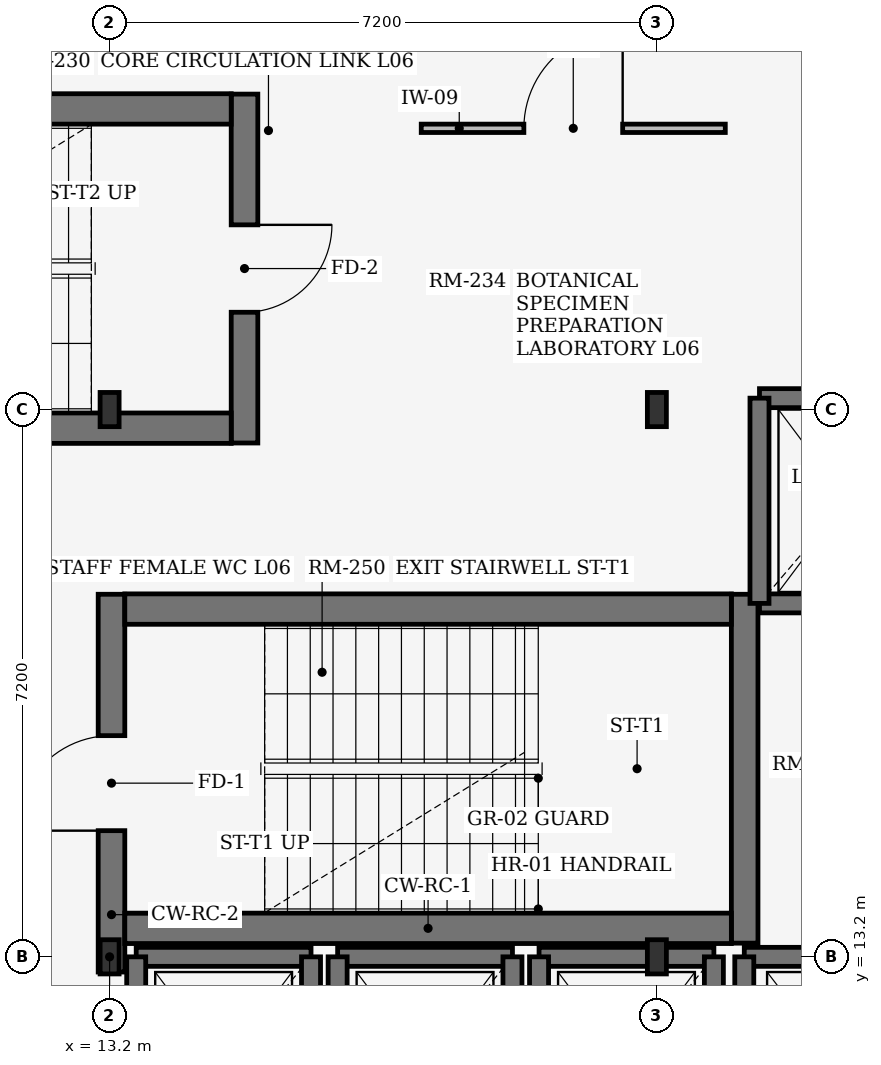
"""IFC4 building model, lengths in metres.
Left out: names, types, materials, properties, quantities, classifications, styles, units other than length and angle.
Written with IfcOpenShell. Run it as: python <this file> out.ifc"""

import sys

from ifc_helpers import new_model, si_unit, direction, frame, frame_2d, origin, origin_2d, place, context, subcontext, project, spatial, rectangle, i_section, extrude, element, fill, save


model = new_model("IFC4")
c1 = context("Model", 3, precision=1e-05, world=origin(), true_north=direction((0.0, 1.0)))
c2 = subcontext(c1, "Body", "Model", "MODEL_VIEW")
j1 = project(units=[si_unit("LENGTHUNIT", "METRE"), si_unit("PLANEANGLEUNIT", "RADIAN")], contexts=[c1])
p1 = place(None, origin())
s1 = spatial("IfcSite", under=j1, at=p1, CompositionType="ELEMENT")
p2 = place(p1, origin())
s2 = spatial("IfcBuilding", under=s1, at=p2, CompositionType="ELEMENT")
p3 = place(p2, frame((0.0, 0.0, 24.9)))
s3 = spatial("IfcBuildingStorey", under=s2, at=p3, CompositionType="ELEMENT", Elevation=24.9)
for number, where, z_axis, x_axis in (
    (1, (13.2, 13.2, 0.0), (0.0, 0.0, 1.0), (1.0, 0.0, 0.0)),
    (2, (13.2, 20.4, 0.0), (0.0, 0.0, 1.0), (1.0, 0.0, 0.0)),
    (3, (20.4, 13.2, 0.0), (0.0, 0.0, 1.0), (1.0, 0.0, 0.0)),
    (4, (20.4, 20.4, 0.0), (0.0, 0.0, 1.0), (1.0, 0.0, 0.0)),
):
    element("IfcColumn", number, at=place(p3, frame(where, z_axis=z_axis, x_axis=x_axis)), inside=s3, PredefinedType="COLUMN", context=c2, shape_type="SweptSolid", body=[
        extrude(i_section(OverallWidth=0.25, OverallDepth=0.45, WebThickness=0.011, FlangeThickness=0.014, at=origin_2d()), origin(), (0.0, 0.0, 1.0), 3.65),
    ])
p4 = place(p3, frame((13.225, 13.0, 0.0), z_axis=(0.0, 0.0, 1.0), x_axis=(0.0, 1.0, 0.0)))
e5 = element("IfcWall", 5, at=p4, inside=s3, PredefinedType="SHEAR", context=c2, shape_type="SweptSolid", body=[
    extrude(rectangle(XDim=4.97, YDim=0.35, at=frame_2d((2.485, 0.0))), origin(), (0.0, 0.0, 1.0), 3.65),
])
p5 = place(p4, frame((1.86, 0.0, 0.0)))
e6 = element("IfcOpeningElement", 6, at=p5, cuts=e5, PredefinedType="OPENING", context=c2, shape_type="SweptSolid", body=[
    extrude(rectangle(XDim=1.25, YDim=2.2, at=frame_2d((0.625, 1.1))), frame((0.0, 0.185, 0.0), z_axis=(0.0, -1.0, 0.0), x_axis=(1.0, 0.0, 0.0)), (0.0, 0.0, 1.0), 0.37),
])
p6 = place(p3, frame((21.555, 13.38, 0.0), z_axis=(0.0, 0.0, 1.0), x_axis=(0.0, 1.0, 0.0)))
e7 = element("IfcWall", 7, at=p6, inside=s3, PredefinedType="SHEAR", context=c2, shape_type="SweptSolid", body=[
    extrude(rectangle(XDim=4.59, YDim=0.35, at=frame_2d((2.295, 0.0))), origin(), (0.0, 0.0, 1.0), 3.65),
])
for number, where, z_axis, x_axis in (
    (8, (13.4, 13.575, 0.0), (0.0, 0.0, 1.0), (1.0, 0.0, 0.0)),
    (9, (13.4, 17.775, 0.0), (0.0, 0.0, 1.0), (1.0, 0.0, 0.0)),
):
    element("IfcWall", number, at=place(p3, frame(where, z_axis=z_axis, x_axis=x_axis)), inside=s3, PredefinedType="SHEAR", context=c2, shape_type="SweptSolid", body=[
        extrude(rectangle(XDim=7.98, YDim=0.4, at=frame_2d((3.99, 0.0))), origin(), (0.0, 0.0, 1.0), 3.65),
    ])
p7 = place(p3, frame((14.975, 24.55, 0.0), z_axis=(0.0, 0.0, 1.0), x_axis=(0.0, -1.0, 0.0)))
e10 = element("IfcWall", 10, at=p7, inside=s3, PredefinedType="SHEAR", context=c2, shape_type="SweptSolid", body=[
    extrude(rectangle(XDim=4.59, YDim=0.35, at=frame_2d((2.295, 0.0))), origin(), (0.0, 0.0, 1.0), 3.65),
])
p8 = place(p7, frame((1.72, 0.0, 0.0)))
e11 = element("IfcOpeningElement", 11, at=p8, cuts=e10, PredefinedType="OPENING", context=c2, shape_type="SweptSolid", body=[
    extrude(rectangle(XDim=1.15, YDim=2.2, at=frame_2d((0.575, 1.1))), frame((0.0, 0.185, 0.0), z_axis=(0.0, -1.0, 0.0), x_axis=(1.0, 0.0, 0.0)), (0.0, 0.0, 1.0), 0.37),
])
for number, where, z_axis, x_axis in (
    (12, (14.8, 24.355, 0.0), (0.0, 0.0, 1.0), (-1.0, 0.0, 0.0)),
    (13, (14.8, 20.155, 0.0), (0.0, 0.0, 1.0), (-1.0, 0.0, 0.0)),
):
    element("IfcWall", number, at=place(p3, frame(where, z_axis=z_axis, x_axis=x_axis)), inside=s3, PredefinedType="SHEAR", context=c2, shape_type="SweptSolid", body=[
        extrude(rectangle(XDim=7.98, YDim=0.4, at=frame_2d((3.99, 0.0))), origin(), (0.0, 0.0, 1.0), 3.65),
    ])
p9 = place(p3, frame((21.75, 17.85, 0.0), z_axis=(0.0, 0.0, 1.0), x_axis=(1.0, 0.0, 0.0)))
e14 = element("IfcWall", 14, at=p9, inside=s3, PredefinedType="SHEAR", context=c2, shape_type="SweptSolid", body=[
    extrude(rectangle(XDim=2.3, YDim=0.25, at=frame_2d((1.15, 0.0))), origin(), (0.0, 0.0, 1.0), 3.65),
])
p10 = place(p9, frame((0.6, 0.0, 0.0)))
e15 = element("IfcOpeningElement", 15, at=p10, cuts=e14, PredefinedType="OPENING", context=c2, shape_type="SweptSolid", body=[
    extrude(rectangle(XDim=1.1, YDim=2.2, at=frame_2d((0.55, 1.1))), frame((0.0, 0.135, 0.0), z_axis=(0.0, -1.0, 0.0), x_axis=(1.0, 0.0, 0.0)), (0.0, 0.0, 1.0), 0.27),
])
p11 = place(p3, frame((21.75, 20.55, 0.0), z_axis=(0.0, 0.0, 1.0), x_axis=(1.0, 0.0, 0.0)))
e16 = element("IfcWall", 16, at=p11, inside=s3, PredefinedType="SHEAR", context=c2, shape_type="SweptSolid", body=[
    extrude(rectangle(XDim=2.3, YDim=0.25, at=frame_2d((1.15, 0.0))), origin(), (0.0, 0.0, 1.0), 3.65),
])
p12 = place(p3, frame((21.75, 17.85, 0.0), z_axis=(0.0, 0.0, 1.0), x_axis=(0.0, 1.0, 0.0)))
e17 = element("IfcWall", 17, at=p12, inside=s3, PredefinedType="SHEAR", context=c2, shape_type="SweptSolid", body=[
    extrude(rectangle(XDim=2.7, YDim=0.25, at=frame_2d((1.35, 0.0))), origin(), (0.0, 0.0, 1.0), 3.65),
])
p13 = place(p3, frame((13.55, 13.2, 0.0), z_axis=(0.0, 0.0, 1.0), x_axis=(1.0, 0.0, 0.0)))
e18 = element("IfcWall", 18, at=p13, inside=s3, PredefinedType="SHEAR", context=c2, shape_type="SweptSolid", body=[
    extrude(rectangle(XDim=2.3, YDim=0.25, at=frame_2d((1.15, 0.0))), origin(), (0.0, 0.0, 1.0), 3.65),
])
for number, where, z_axis, x_axis in (
    (19, (13.55, 10.4, 0.0), (0.0, 0.0, 1.0), (0.0, 1.0, 0.0)),
    (20, (15.85, 10.4, 0.0), (0.0, 0.0, 1.0), (0.0, 1.0, 0.0)),
):
    element("IfcWall", number, at=place(p3, frame(where, z_axis=z_axis, x_axis=x_axis)), inside=s3, PredefinedType="SHEAR", context=c2, shape_type="SweptSolid", body=[
        extrude(rectangle(XDim=2.8, YDim=0.25, at=frame_2d((1.4, 0.0))), origin(), (0.0, 0.0, 1.0), 3.65),
    ])
p14 = place(p3, frame((16.2, 13.2, 0.0), z_axis=(0.0, 0.0, 1.0), x_axis=(1.0, 0.0, 0.0)))
e21 = element("IfcWall", 21, at=p14, inside=s3, PredefinedType="SHEAR", context=c2, shape_type="SweptSolid", body=[
    extrude(rectangle(XDim=2.3, YDim=0.25, at=frame_2d((1.15, 0.0))), origin(), (0.0, 0.0, 1.0), 3.65),
])
for number, where, z_axis, x_axis in (
    (22, (16.2, 10.4, 0.0), (0.0, 0.0, 1.0), (0.0, 1.0, 0.0)),
    (23, (18.5, 10.4, 0.0), (0.0, 0.0, 1.0), (0.0, 1.0, 0.0)),
):
    element("IfcWall", number, at=place(p3, frame(where, z_axis=z_axis, x_axis=x_axis)), inside=s3, PredefinedType="SHEAR", context=c2, shape_type="SweptSolid", body=[
        extrude(rectangle(XDim=2.8, YDim=0.25, at=frame_2d((1.4, 0.0))), origin(), (0.0, 0.0, 1.0), 3.65),
    ])
p15 = place(p3, frame((18.85, 13.2, 0.0), z_axis=(0.0, 0.0, 1.0), x_axis=(1.0, 0.0, 0.0)))
e24 = element("IfcWall", 24, at=p15, inside=s3, PredefinedType="SHEAR", context=c2, shape_type="SweptSolid", body=[
    extrude(rectangle(XDim=2.3, YDim=0.25, at=frame_2d((1.15, 0.0))), origin(), (0.0, 0.0, 1.0), 3.65),
])
for number, where, z_axis, x_axis in (
    (25, (18.85, 10.4, 0.0), (0.0, 0.0, 1.0), (0.0, 1.0, 0.0)),
    (26, (21.15, 10.4, 0.0), (0.0, 0.0, 1.0), (0.0, 1.0, 0.0)),
):
    element("IfcWall", number, at=place(p3, frame(where, z_axis=z_axis, x_axis=x_axis)), inside=s3, PredefinedType="SHEAR", context=c2, shape_type="SweptSolid", body=[
        extrude(rectangle(XDim=2.8, YDim=0.25, at=frame_2d((1.4, 0.0))), origin(), (0.0, 0.0, 1.0), 3.65),
    ])
p16 = place(p3, frame((21.55, 13.2, 0.0), z_axis=(0.0, 0.0, 1.0), x_axis=(1.0, 0.0, 0.0)))
e27 = element("IfcWall", 27, at=p16, inside=s3, PredefinedType="SHEAR", context=c2, shape_type="SweptSolid", body=[
    extrude(rectangle(XDim=2.6, YDim=0.25, at=frame_2d((1.3, 0.0))), origin(), (0.0, 0.0, 1.0), 3.65),
])
p17 = place(p3, frame((21.55, 10.2, 0.0), z_axis=(0.0, 0.0, 1.0), x_axis=(0.0, 1.0, 0.0)))
e28 = element("IfcWall", 28, at=p17, inside=s3, PredefinedType="SHEAR", context=c2, shape_type="SweptSolid", body=[
    extrude(rectangle(XDim=3.0, YDim=0.25, at=frame_2d((1.5, 0.0))), origin(), (0.0, 0.0, 1.0), 3.65),
])
p18 = place(p3, frame((17.3, 24.1, 0.0), z_axis=(0.0, 0.0, 1.0), x_axis=(1.0, 0.0, 0.0)))
e29 = element("IfcWall", 29, at=p18, inside=s3, PredefinedType="PARTITIONING", context=c2, shape_type="SweptSolid", body=[
    extrude(rectangle(XDim=4.0, YDim=0.11, at=frame_2d((2.0, 0.0))), origin(), (0.0, 0.0, 1.0), 3.63),
])
p19 = place(p18, frame((1.35, 0.0, 0.0)))
e30 = element("IfcOpeningElement", 30, at=p19, cuts=e29, PredefinedType="OPENING", context=c2, shape_type="SweptSolid", body=[
    extrude(rectangle(XDim=1.3, YDim=2.2, at=frame_2d((0.65, 1.1))), frame((0.0, 0.065, 0.0), z_axis=(0.0, -1.0, 0.0), x_axis=(1.0, 0.0, 0.0)), (0.0, 0.0, 1.0), 0.13),
])
p20 = place(p5, origin())
e31 = element("IfcDoor", 31, at=p20, inside=s3, OperationType="SINGLE_SWING_LEFT", PredefinedType="DOOR", context=c2, shape_type="SweptSolid", body=[
    extrude(rectangle(XDim=1.25, YDim=2.2, at=frame_2d((0.625, 1.1))), frame((0.0, 0.025, 0.0), z_axis=(0.0, -1.0, 0.0), x_axis=(1.0, 0.0, 0.0)), (0.0, 0.0, 1.0), 0.05),
])
fill(e6, e31)
p21 = place(p8, origin())
e32 = element("IfcDoor", 32, at=p21, inside=s3, OperationType="SINGLE_SWING_LEFT", PredefinedType="DOOR", context=c2, shape_type="SweptSolid", body=[
    extrude(rectangle(XDim=1.15, YDim=2.2, at=frame_2d((0.575, 1.1))), frame((0.0, 0.025, 0.0), z_axis=(0.0, -1.0, 0.0), x_axis=(1.0, 0.0, 0.0)), (0.0, 0.0, 1.0), 0.05),
])
fill(e11, e32)
p22 = place(p19, frame((1.3, 0.0, 0.0), z_axis=(0.0, 0.0, 1.0), x_axis=(-1.0, 0.0, 0.0)))
e33 = element("IfcDoor", 33, at=p22, inside=s3, OperationType="SINGLE_SWING_RIGHT", PredefinedType="DOOR", context=c2, shape_type="SweptSolid", body=[
    extrude(rectangle(XDim=1.3, YDim=2.2, at=frame_2d((0.65, 1.1))), frame((0.0, 0.025, 0.0), z_axis=(0.0, -1.0, 0.0), x_axis=(1.0, 0.0, 0.0)), (0.0, 0.0, 1.0), 0.05),
])
fill(e30, e33)
save(model, sys.argv[1])
